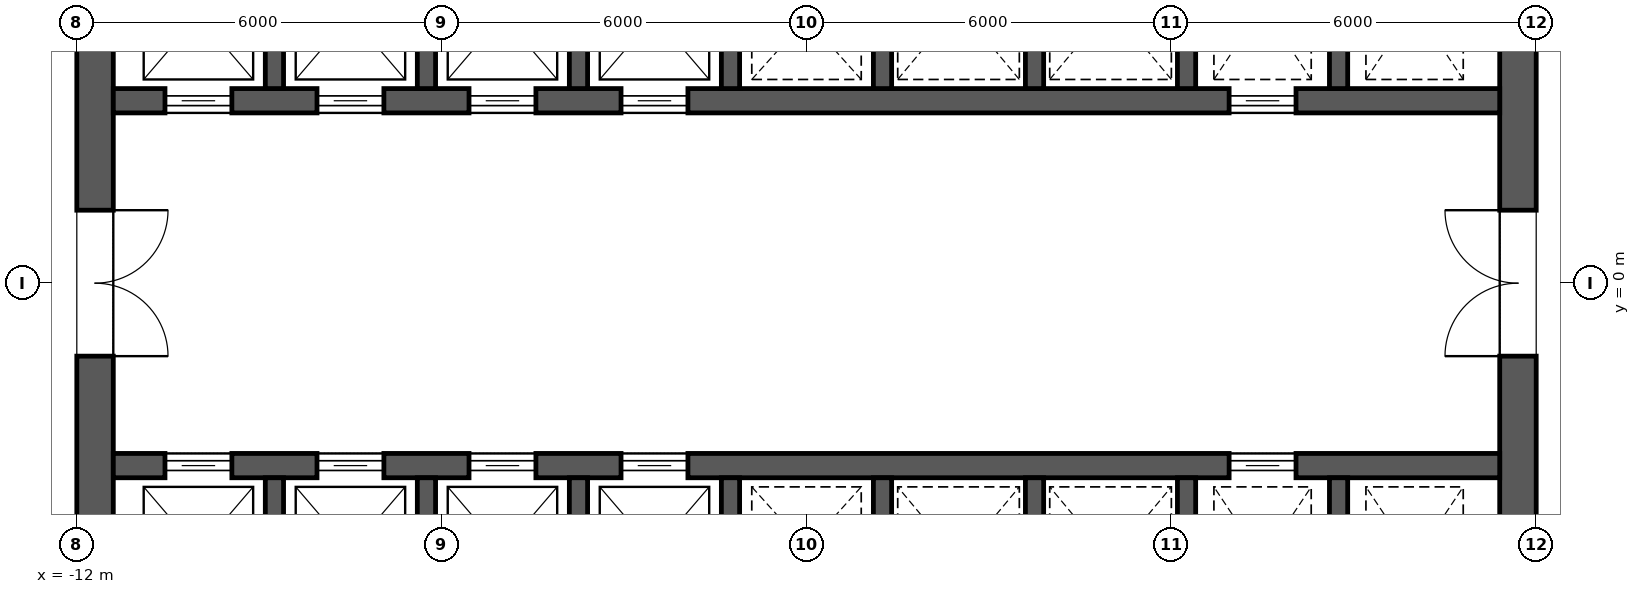
"""IFC4 building model, lengths in metres.
Left out: names, types, materials, properties, quantities, classifications, styles, units other than length and angle.
Written with IfcOpenShell. Run it as: python <this file> out.ifc"""

import sys

from ifc_helpers import new_model, si_unit, direction, frame, frame_2d, origin, place, context, subcontext, project, spatial, rectangle, extrude, element, fill, save


model = new_model("IFC4")
c1 = context("Model", 3, precision=1e-05, world=origin(), true_north=direction((0.0, 1.0)))
c2 = subcontext(c1, "Body", "Model", "MODEL_VIEW")
j1 = project(units=[si_unit("LENGTHUNIT", "METRE"), si_unit("PLANEANGLEUNIT", "RADIAN")], contexts=[c1])
p1 = place(None, origin())
s1 = spatial("IfcSite", under=j1, at=p1, CompositionType="ELEMENT")
p2 = place(p1, origin())
s2 = spatial("IfcBuilding", under=s1, at=p2, CompositionType="ELEMENT")
p3 = place(p2, frame((0.0, 0.0, 129.7)))
s3 = spatial("IfcBuildingStorey", under=s2, at=p3, CompositionType="ELEMENT", Elevation=129.7)
p4 = place(p3, frame((11.7, -11.4, 0.0), z_axis=(0.0, 0.0, 1.0), x_axis=(0.0, 1.0, 0.0)))
e1 = element("IfcWall", 1, at=p4, inside=s3, PredefinedType="SHEAR", context=c2, shape_type="SweptSolid", body=[
    extrude(rectangle(XDim=22.8, YDim=0.6, at=frame_2d((11.4, 0.0))), origin(), (0.0, 0.0, 1.0), 4.2),
])
p5 = place(p4, frame((10.2, 0.0, 0.0)))
e2 = element("IfcOpeningElement", 2, at=p5, cuts=e1, PredefinedType="OPENING", context=c2, shape_type="SweptSolid", body=[
    extrude(rectangle(XDim=2.4, YDim=2.1, at=frame_2d((1.2, 1.05))), frame((0.0, 0.312, 0.0), z_axis=(0.0, -1.0, 0.0), x_axis=(1.0, 0.0, 0.0)), (0.0, 0.0, 1.0), 0.624),
])
p6 = place(p4, frame((19.5, 0.0, 0.0)))
e3 = element("IfcOpeningElement", 3, at=p6, cuts=e1, PredefinedType="OPENING", context=c2, shape_type="SweptSolid", body=[
    extrude(rectangle(XDim=1.2, YDim=2.1, at=frame_2d((0.6, 1.05))), frame((0.0, 0.312, 0.0), z_axis=(0.0, -1.0, 0.0), x_axis=(1.0, 0.0, 0.0)), (0.0, 0.0, 1.0), 0.624),
])
p7 = place(p4, frame((2.1, 0.0, 0.0)))
e4 = element("IfcOpeningElement", 4, at=p7, cuts=e1, PredefinedType="OPENING", context=c2, shape_type="SweptSolid", body=[
    extrude(rectangle(XDim=1.2, YDim=2.1, at=frame_2d((0.6, 1.05))), frame((0.0, 0.312, 0.0), z_axis=(0.0, -1.0, 0.0), x_axis=(1.0, 0.0, 0.0)), (0.0, 0.0, 1.0), 0.624),
])
p8 = place(p3, frame((-11.7, -11.4, 0.0), z_axis=(0.0, 0.0, 1.0), x_axis=(0.0, 1.0, 0.0)))
e5 = element("IfcWall", 5, at=p8, inside=s3, PredefinedType="SHEAR", context=c2, shape_type="SweptSolid", body=[
    extrude(rectangle(XDim=22.8, YDim=0.6, at=frame_2d((11.4, 0.0))), origin(), (0.0, 0.0, 1.0), 4.2),
])
p9 = place(p8, frame((10.2, 0.0, 0.0)))
e6 = element("IfcOpeningElement", 6, at=p9, cuts=e5, PredefinedType="OPENING", context=c2, shape_type="SweptSolid", body=[
    extrude(rectangle(XDim=2.4, YDim=2.1, at=frame_2d((1.2, 1.05))), frame((0.0, 0.312, 0.0), z_axis=(0.0, -1.0, 0.0), x_axis=(1.0, 0.0, 0.0)), (0.0, 0.0, 1.0), 0.624),
])
p10 = place(p8, frame((18.925, 0.0, 0.0)))
e7 = element("IfcOpeningElement", 7, at=p10, cuts=e5, PredefinedType="OPENING", context=c2, shape_type="SweptSolid", body=[
    extrude(rectangle(XDim=1.2, YDim=2.1, at=frame_2d((0.6, 1.05))), frame((0.0, 0.312, 0.0), z_axis=(0.0, -1.0, 0.0), x_axis=(1.0, 0.0, 0.0)), (0.0, 0.0, 1.0), 0.624),
])
p11 = place(p8, frame((2.675, 0.0, 0.0)))
e8 = element("IfcOpeningElement", 8, at=p11, cuts=e5, PredefinedType="OPENING", context=c2, shape_type="SweptSolid", body=[
    extrude(rectangle(XDim=1.2, YDim=2.1, at=frame_2d((0.6, 1.05))), frame((0.0, 0.312, 0.0), z_axis=(0.0, -1.0, 0.0), x_axis=(1.0, 0.0, 0.0)), (0.0, 0.0, 1.0), 0.624),
])
p12 = place(p3, frame((-11.4, 3.0, 0.0), z_axis=(0.0, 0.0, 1.0), x_axis=(1.0, 0.0, 0.0)))
e9 = element("IfcWall", 9, at=p12, inside=s3, PredefinedType="SHEAR", context=c2, shape_type="SweptSolid", body=[
    extrude(rectangle(XDim=22.8, YDim=0.4, at=frame_2d((11.4, 0.0))), origin(), (0.0, 0.0, 1.0), 4.2),
])
p13 = place(p12, frame((0.85, 0.0, 0.0)))
e10 = element("IfcOpeningElement", 10, at=p13, cuts=e9, PredefinedType="OPENING", context=c2, shape_type="SweptSolid", body=[
    extrude(rectangle(XDim=1.1, YDim=2.1, at=frame_2d((0.55, 1.05))), frame((0.0, 0.212, 0.0), z_axis=(0.0, -1.0, 0.0), x_axis=(1.0, 0.0, 0.0)), (0.0, 0.0, 1.0), 0.424),
])
p14 = place(p12, frame((3.35, 0.0, 0.0)))
e11 = element("IfcOpeningElement", 11, at=p14, cuts=e9, PredefinedType="OPENING", context=c2, shape_type="SweptSolid", body=[
    extrude(rectangle(XDim=1.1, YDim=2.1, at=frame_2d((0.55, 1.05))), frame((0.0, 0.212, 0.0), z_axis=(0.0, -1.0, 0.0), x_axis=(1.0, 0.0, 0.0)), (0.0, 0.0, 1.0), 0.424),
])
p15 = place(p12, frame((5.85, 0.0, 0.0)))
e12 = element("IfcOpeningElement", 12, at=p15, cuts=e9, PredefinedType="OPENING", context=c2, shape_type="SweptSolid", body=[
    extrude(rectangle(XDim=1.1, YDim=2.1, at=frame_2d((0.55, 1.05))), frame((0.0, 0.212, 0.0), z_axis=(0.0, -1.0, 0.0), x_axis=(1.0, 0.0, 0.0)), (0.0, 0.0, 1.0), 0.424),
])
p16 = place(p12, frame((8.35, 0.0, 0.0)))
e13 = element("IfcOpeningElement", 13, at=p16, cuts=e9, PredefinedType="OPENING", context=c2, shape_type="SweptSolid", body=[
    extrude(rectangle(XDim=1.1, YDim=2.1, at=frame_2d((0.55, 1.05))), frame((0.0, 0.212, 0.0), z_axis=(0.0, -1.0, 0.0), x_axis=(1.0, 0.0, 0.0)), (0.0, 0.0, 1.0), 0.424),
])
p17 = place(p12, frame((18.35, 0.0, 0.0)))
e14 = element("IfcOpeningElement", 14, at=p17, cuts=e9, PredefinedType="OPENING", context=c2, shape_type="SweptSolid", body=[
    extrude(rectangle(XDim=1.1, YDim=2.1, at=frame_2d((0.55, 1.05))), frame((0.0, 0.212, 0.0), z_axis=(0.0, -1.0, 0.0), x_axis=(1.0, 0.0, 0.0)), (0.0, 0.0, 1.0), 0.424),
])
for number, where, z_axis, x_axis in (
    (15, (-8.75, 3.2, 0.0), (0.0, 0.0, 1.0), (0.0, 1.0, 0.0)),
    (16, (-6.25, 3.2, 0.0), (0.0, 0.0, 1.0), (0.0, 1.0, 0.0)),
    (17, (-3.75, 3.2, 0.0), (0.0, 0.0, 1.0), (0.0, 1.0, 0.0)),
    (18, (-1.25, 3.2, 0.0), (0.0, 0.0, 1.0), (0.0, 1.0, 0.0)),
    (19, (1.25, 3.2, 0.0), (0.0, 0.0, 1.0), (0.0, 1.0, 0.0)),
    (20, (3.75, 3.2, 0.0), (0.0, 0.0, 1.0), (0.0, 1.0, 0.0)),
    (21, (6.25, 3.2, 0.0), (0.0, 0.0, 1.0), (0.0, 1.0, 0.0)),
    (22, (8.75, 3.2, 0.0), (0.0, 0.0, 1.0), (0.0, 1.0, 0.0)),
):
    element("IfcWall", number, at=place(p3, frame(where, z_axis=z_axis, x_axis=x_axis)), inside=s3, PredefinedType="SHEAR", context=c2, shape_type="SweptSolid", body=[
        extrude(rectangle(XDim=2.9, YDim=0.3, at=frame_2d((1.45, 0.0))), origin(), (0.0, 0.0, 1.0), 4.2),
    ])
p18 = place(p3, frame((-11.4, -3.0, 0.0), z_axis=(0.0, 0.0, 1.0), x_axis=(1.0, 0.0, 0.0)))
e23 = element("IfcWall", 23, at=p18, inside=s3, PredefinedType="SHEAR", context=c2, shape_type="SweptSolid", body=[
    extrude(rectangle(XDim=22.8, YDim=0.4, at=frame_2d((11.4, 0.0))), origin(), (0.0, 0.0, 1.0), 4.2),
])
p19 = place(p18, frame((0.85, 0.0, 0.0)))
e24 = element("IfcOpeningElement", 24, at=p19, cuts=e23, PredefinedType="OPENING", context=c2, shape_type="SweptSolid", body=[
    extrude(rectangle(XDim=1.1, YDim=2.1, at=frame_2d((0.55, 1.05))), frame((0.0, 0.212, 0.0), z_axis=(0.0, -1.0, 0.0), x_axis=(1.0, 0.0, 0.0)), (0.0, 0.0, 1.0), 0.424),
])
p20 = place(p18, frame((3.35, 0.0, 0.0)))
e25 = element("IfcOpeningElement", 25, at=p20, cuts=e23, PredefinedType="OPENING", context=c2, shape_type="SweptSolid", body=[
    extrude(rectangle(XDim=1.1, YDim=2.1, at=frame_2d((0.55, 1.05))), frame((0.0, 0.212, 0.0), z_axis=(0.0, -1.0, 0.0), x_axis=(1.0, 0.0, 0.0)), (0.0, 0.0, 1.0), 0.424),
])
p21 = place(p18, frame((5.85, 0.0, 0.0)))
e26 = element("IfcOpeningElement", 26, at=p21, cuts=e23, PredefinedType="OPENING", context=c2, shape_type="SweptSolid", body=[
    extrude(rectangle(XDim=1.1, YDim=2.1, at=frame_2d((0.55, 1.05))), frame((0.0, 0.212, 0.0), z_axis=(0.0, -1.0, 0.0), x_axis=(1.0, 0.0, 0.0)), (0.0, 0.0, 1.0), 0.424),
])
p22 = place(p18, frame((8.35, 0.0, 0.0)))
e27 = element("IfcOpeningElement", 27, at=p22, cuts=e23, PredefinedType="OPENING", context=c2, shape_type="SweptSolid", body=[
    extrude(rectangle(XDim=1.1, YDim=2.1, at=frame_2d((0.55, 1.05))), frame((0.0, 0.212, 0.0), z_axis=(0.0, -1.0, 0.0), x_axis=(1.0, 0.0, 0.0)), (0.0, 0.0, 1.0), 0.424),
])
p23 = place(p18, frame((18.35, 0.0, 0.0)))
e28 = element("IfcOpeningElement", 28, at=p23, cuts=e23, PredefinedType="OPENING", context=c2, shape_type="SweptSolid", body=[
    extrude(rectangle(XDim=1.1, YDim=2.1, at=frame_2d((0.55, 1.05))), frame((0.0, 0.212, 0.0), z_axis=(0.0, -1.0, 0.0), x_axis=(1.0, 0.0, 0.0)), (0.0, 0.0, 1.0), 0.424),
])
for number, where, z_axis, x_axis in (
    (29, (-8.75, -6.1, 0.0), (0.0, 0.0, 1.0), (0.0, 1.0, 0.0)),
    (30, (-6.25, -6.1, 0.0), (0.0, 0.0, 1.0), (0.0, 1.0, 0.0)),
    (31, (-3.75, -6.1, 0.0), (0.0, 0.0, 1.0), (0.0, 1.0, 0.0)),
    (32, (-1.25, -6.1, 0.0), (0.0, 0.0, 1.0), (0.0, 1.0, 0.0)),
    (33, (1.25, -6.1, 0.0), (0.0, 0.0, 1.0), (0.0, 1.0, 0.0)),
    (34, (3.75, -6.1, 0.0), (0.0, 0.0, 1.0), (0.0, 1.0, 0.0)),
    (35, (6.25, -6.1, 0.0), (0.0, 0.0, 1.0), (0.0, 1.0, 0.0)),
    (36, (8.75, -6.1, 0.0), (0.0, 0.0, 1.0), (0.0, 1.0, 0.0)),
):
    element("IfcWall", number, at=place(p3, frame(where, z_axis=z_axis, x_axis=x_axis)), inside=s3, PredefinedType="SHEAR", context=c2, shape_type="SweptSolid", body=[
        extrude(rectangle(XDim=2.9, YDim=0.3, at=frame_2d((1.45, 0.0))), origin(), (0.0, 0.0, 1.0), 4.2),
    ])
p24 = place(p13, origin())
e37 = element("IfcDoor", 37, at=p24, inside=s3, OperationType="SLIDING_TO_LEFT", PredefinedType="DOOR", context=c2, shape_type="SweptSolid", body=[
    extrude(rectangle(XDim=1.1, YDim=2.1, at=frame_2d((0.55, 1.05))), frame((0.0, 0.025, 0.0), z_axis=(0.0, -1.0, 0.0), x_axis=(1.0, 0.0, 0.0)), (0.0, 0.0, 1.0), 0.05),
])
fill(e10, e37)
p25 = place(p14, origin())
e38 = element("IfcDoor", 38, at=p25, inside=s3, OperationType="SLIDING_TO_LEFT", PredefinedType="DOOR", context=c2, shape_type="SweptSolid", body=[
    extrude(rectangle(XDim=1.1, YDim=2.1, at=frame_2d((0.55, 1.05))), frame((0.0, 0.025, 0.0), z_axis=(0.0, -1.0, 0.0), x_axis=(1.0, 0.0, 0.0)), (0.0, 0.0, 1.0), 0.05),
])
fill(e11, e38)
p26 = place(p15, origin())
e39 = element("IfcDoor", 39, at=p26, inside=s3, OperationType="SLIDING_TO_LEFT", PredefinedType="DOOR", context=c2, shape_type="SweptSolid", body=[
    extrude(rectangle(XDim=1.1, YDim=2.1, at=frame_2d((0.55, 1.05))), frame((0.0, 0.025, 0.0), z_axis=(0.0, -1.0, 0.0), x_axis=(1.0, 0.0, 0.0)), (0.0, 0.0, 1.0), 0.05),
])
fill(e12, e39)
p27 = place(p16, origin())
e40 = element("IfcDoor", 40, at=p27, inside=s3, OperationType="SLIDING_TO_LEFT", PredefinedType="DOOR", context=c2, shape_type="SweptSolid", body=[
    extrude(rectangle(XDim=1.1, YDim=2.1, at=frame_2d((0.55, 1.05))), frame((0.0, 0.025, 0.0), z_axis=(0.0, -1.0, 0.0), x_axis=(1.0, 0.0, 0.0)), (0.0, 0.0, 1.0), 0.05),
])
fill(e13, e40)
p28 = place(p19, origin())
e41 = element("IfcDoor", 41, at=p28, inside=s3, OperationType="SLIDING_TO_LEFT", PredefinedType="DOOR", context=c2, shape_type="SweptSolid", body=[
    extrude(rectangle(XDim=1.1, YDim=2.1, at=frame_2d((0.55, 1.05))), frame((0.0, 0.025, 0.0), z_axis=(0.0, -1.0, 0.0), x_axis=(1.0, 0.0, 0.0)), (0.0, 0.0, 1.0), 0.05),
])
fill(e24, e41)
p29 = place(p20, origin())
e42 = element("IfcDoor", 42, at=p29, inside=s3, OperationType="SLIDING_TO_LEFT", PredefinedType="DOOR", context=c2, shape_type="SweptSolid", body=[
    extrude(rectangle(XDim=1.1, YDim=2.1, at=frame_2d((0.55, 1.05))), frame((0.0, 0.025, 0.0), z_axis=(0.0, -1.0, 0.0), x_axis=(1.0, 0.0, 0.0)), (0.0, 0.0, 1.0), 0.05),
])
fill(e25, e42)
p30 = place(p21, origin())
e43 = element("IfcDoor", 43, at=p30, inside=s3, OperationType="SLIDING_TO_LEFT", PredefinedType="DOOR", context=c2, shape_type="SweptSolid", body=[
    extrude(rectangle(XDim=1.1, YDim=2.1, at=frame_2d((0.55, 1.05))), frame((0.0, 0.025, 0.0), z_axis=(0.0, -1.0, 0.0), x_axis=(1.0, 0.0, 0.0)), (0.0, 0.0, 1.0), 0.05),
])
fill(e26, e43)
p31 = place(p22, origin())
e44 = element("IfcDoor", 44, at=p31, inside=s3, OperationType="SLIDING_TO_LEFT", PredefinedType="DOOR", context=c2, shape_type="SweptSolid", body=[
    extrude(rectangle(XDim=1.1, YDim=2.1, at=frame_2d((0.55, 1.05))), frame((0.0, 0.025, 0.0), z_axis=(0.0, -1.0, 0.0), x_axis=(1.0, 0.0, 0.0)), (0.0, 0.0, 1.0), 0.05),
])
fill(e27, e44)
p32 = place(p17, origin())
e45 = element("IfcDoor", 45, at=p32, inside=s3, OperationType="SLIDING_TO_LEFT", PredefinedType="DOOR", context=c2, shape_type="SweptSolid", body=[
    extrude(rectangle(XDim=1.1, YDim=2.1, at=frame_2d((0.55, 1.05))), frame((0.0, 0.025, 0.0), z_axis=(0.0, -1.0, 0.0), x_axis=(1.0, 0.0, 0.0)), (0.0, 0.0, 1.0), 0.05),
])
fill(e14, e45)
p33 = place(p23, origin())
e46 = element("IfcDoor", 46, at=p33, inside=s3, OperationType="SLIDING_TO_LEFT", PredefinedType="DOOR", context=c2, shape_type="SweptSolid", body=[
    extrude(rectangle(XDim=1.1, YDim=2.1, at=frame_2d((0.55, 1.05))), frame((0.0, 0.025, 0.0), z_axis=(0.0, -1.0, 0.0), x_axis=(1.0, 0.0, 0.0)), (0.0, 0.0, 1.0), 0.05),
])
fill(e28, e46)
p34 = place(p9, frame((2.4, 0.0, 0.0), z_axis=(0.0, 0.0, 1.0), x_axis=(-1.0, 0.0, 0.0)))
e47 = element("IfcDoor", 47, at=p34, inside=s3, OperationType="DOUBLE_DOOR_SINGLE_SWING", PredefinedType="DOOR", context=c2, shape_type="SweptSolid", body=[
    extrude(rectangle(XDim=2.4, YDim=2.1, at=frame_2d((1.2, 1.05))), frame((0.0, 0.025, 0.0), z_axis=(0.0, -1.0, 0.0), x_axis=(1.0, 0.0, 0.0)), (0.0, 0.0, 1.0), 0.05),
])
fill(e6, e47)
p35 = place(p5, origin())
e48 = element("IfcDoor", 48, at=p35, inside=s3, OperationType="DOUBLE_DOOR_SINGLE_SWING", PredefinedType="DOOR", context=c2, shape_type="SweptSolid", body=[
    extrude(rectangle(XDim=2.4, YDim=2.1, at=frame_2d((1.2, 1.05))), frame((0.0, 0.025, 0.0), z_axis=(0.0, -1.0, 0.0), x_axis=(1.0, 0.0, 0.0)), (0.0, 0.0, 1.0), 0.05),
])
fill(e2, e48)
save(model, sys.argv[1])
